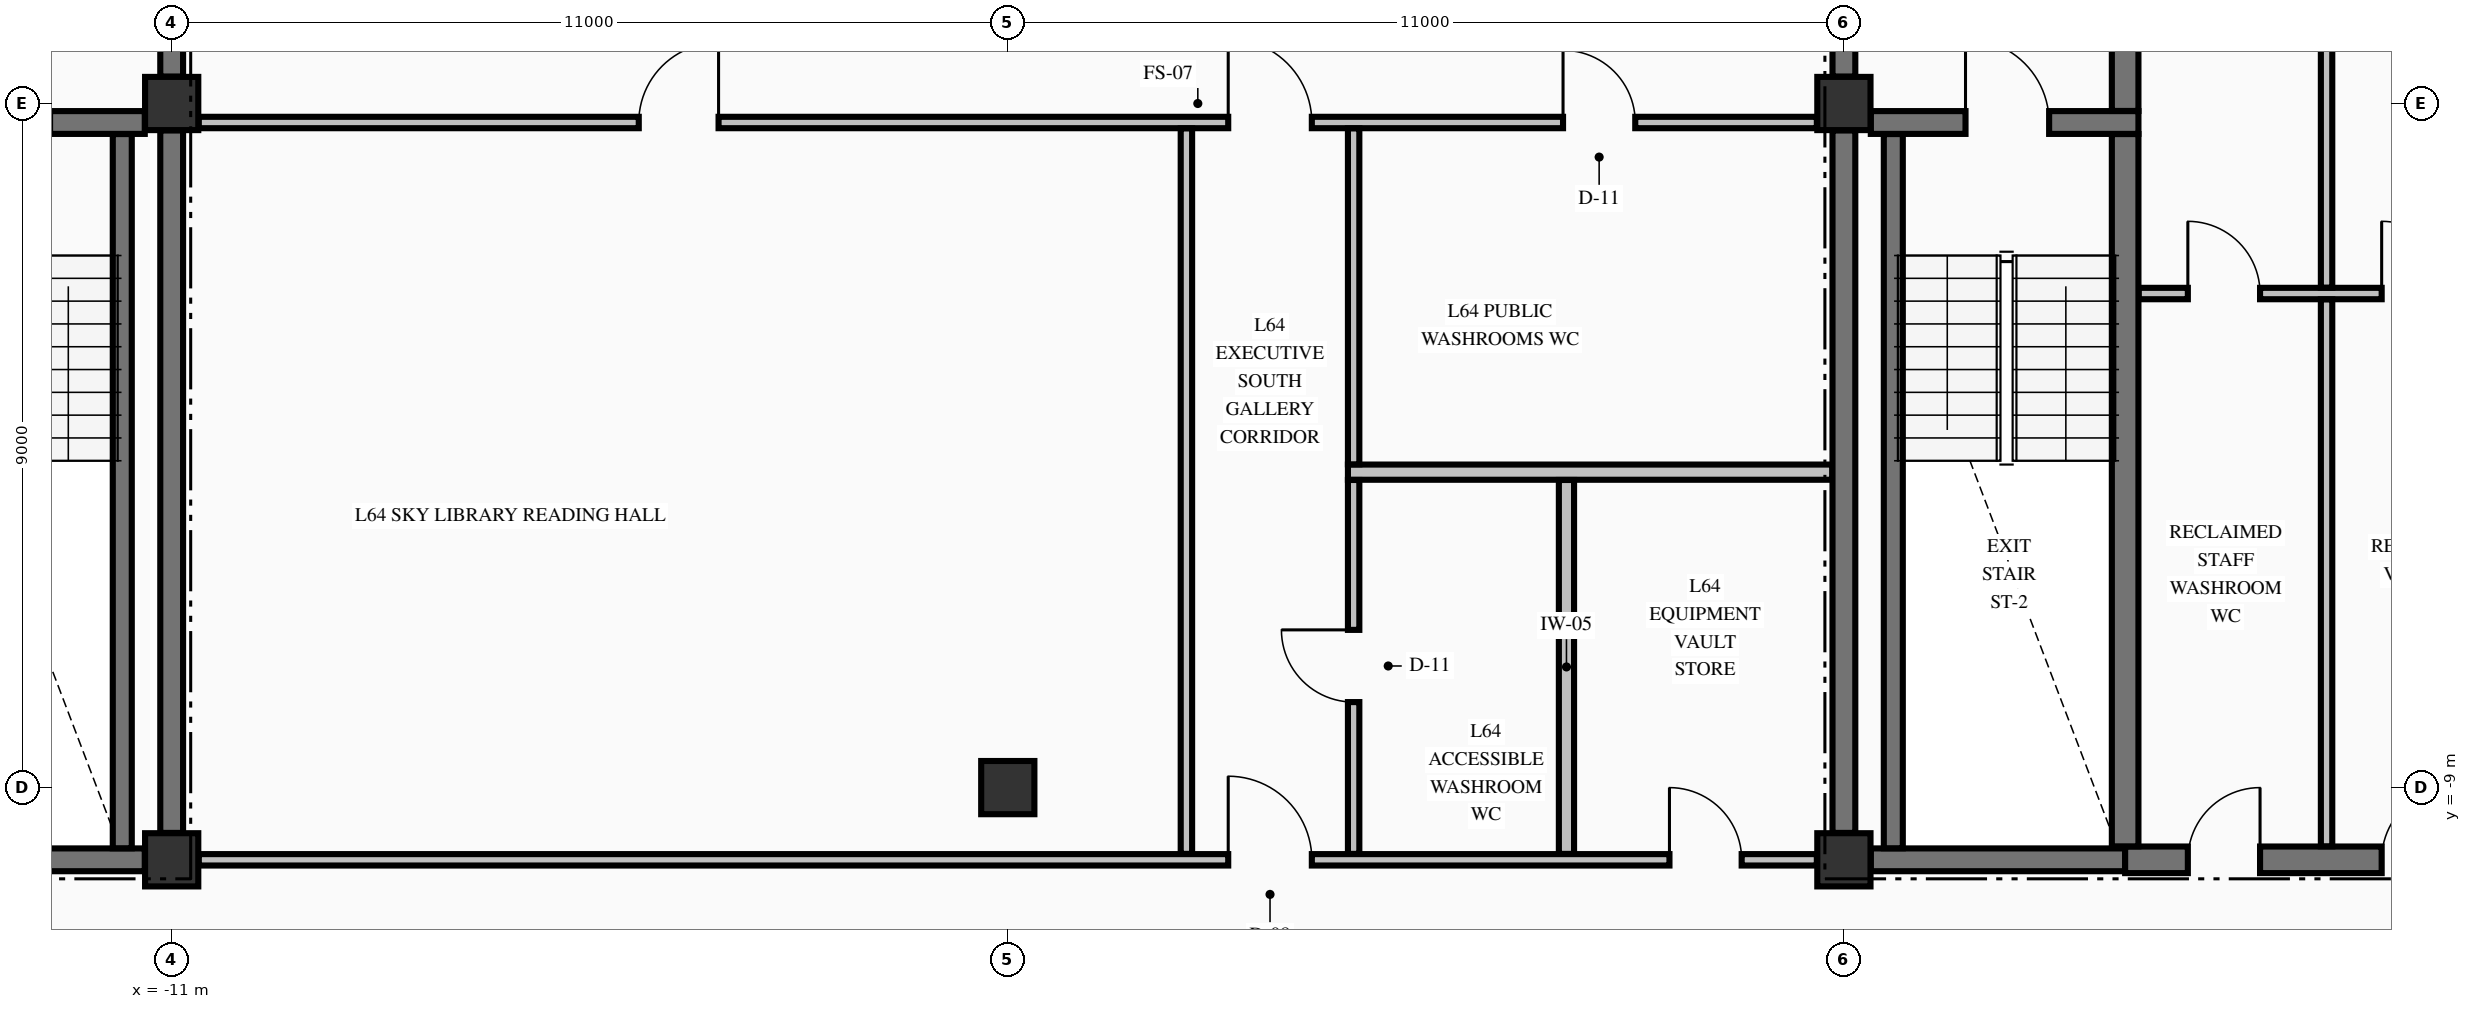
"""IFC4 building model, lengths in metres.
Left out: names, types, materials, properties, quantities, classifications, styles, units other than length and angle.
Written with IfcOpenShell. Run it as: python <this file> out.ifc"""

import sys

from ifc_helpers import new_model, si_unit, direction, frame, frame_2d, origin, origin_2d, place, context, subcontext, project, spatial, rectangle, extrude, element, fill, save


model = new_model("IFC4")
c1 = context("Model", 3, precision=1e-05, world=origin(), true_north=direction((0.0, 1.0)))
c2 = subcontext(c1, "Body", "Model", "MODEL_VIEW")
j1 = project(units=[si_unit("LENGTHUNIT", "METRE"), si_unit("PLANEANGLEUNIT", "RADIAN")], contexts=[c1])
p1 = place(None, origin())
s1 = spatial("IfcSite", under=j1, at=p1, CompositionType="ELEMENT")
p2 = place(p1, origin())
s2 = spatial("IfcBuilding", under=s1, at=p2, CompositionType="ELEMENT")
p3 = place(p2, frame((0.0, 0.0, 242.97)))
s3 = spatial("IfcBuildingStorey", under=s2, at=p3, CompositionType="ELEMENT", Elevation=242.97)
for number, where, z_axis, x_axis in (
    (1, (-11.0, -9.95, -0.25), (0.0, 0.0, 1.0), (1.0, 0.0, 0.0)),
    (2, (-11.0, 0.0, -0.25), (0.0, 0.0, 1.0), (1.0, 0.0, 0.0)),
    (3, (11.0, -9.95, -0.25), (0.0, 0.0, 1.0), (1.0, 0.0, 0.0)),
    (4, (11.0, 0.0, -0.25), (0.0, 0.0, 1.0), (1.0, 0.0, 0.0)),
    (5, (0.0, -9.0, -0.25), (0.0, 0.0, 1.0), (1.0, 0.0, 0.0)),
):
    element("IfcColumn", number, at=place(p3, frame(where, z_axis=z_axis, x_axis=x_axis)), inside=s3, PredefinedType="COLUMN", context=c2, shape_type="SweptSolid", body=[
        extrude(rectangle(XDim=0.7, YDim=0.7, at=origin_2d()), origin(), (0.0, 0.0, 1.0), 3.23),
    ])
for number, where, z_axis, x_axis in (
    (6, (-14.7, -9.95, 0.0), (0.0, 0.0, 1.0), (1.0, 0.0, 0.0)),
    (7, (11.354, -9.95, 0.0), (0.0, 0.0, 1.0), (1.0, 0.0, 0.0)),
):
    element("IfcWall", number, at=place(p3, frame(where, z_axis=z_axis, x_axis=x_axis)), inside=s3, PredefinedType="SHEAR", context=c2, shape_type="SweptSolid", body=[
        extrude(rectangle(XDim=3.346, YDim=0.3, at=frame_2d((1.673, 0.0))), origin(), (0.0, 0.0, 1.0), 2.98),
    ])
p4 = place(p3, frame((14.7, -9.95, 0.0), z_axis=(0.0, 0.0, 1.0), x_axis=(1.0, 0.0, 0.0)))
e8 = element("IfcWall", 8, at=p4, inside=s3, PredefinedType="SHEAR", context=c2, shape_type="SweptSolid", body=[
    extrude(rectangle(XDim=4.946, YDim=0.35, at=frame_2d((2.473, 0.0))), origin(), (0.0, 0.0, 1.0), 2.98),
])
p5 = place(p4, frame((0.825, 0.0, 0.0)))
e9 = element("IfcOpeningElement", 9, at=p5, cuts=e8, PredefinedType="OPENING", context=c2, shape_type="SweptSolid", body=[
    extrude(rectangle(XDim=0.95, YDim=2.15, at=frame_2d((0.475, 1.075))), frame((0.0, 0.185, 0.0), z_axis=(0.0, -1.0, 0.0), x_axis=(1.0, 0.0, 0.0)), (0.0, 0.0, 1.0), 0.37),
])
p6 = place(p4, frame((3.375, 0.0, 0.0)))
e10 = element("IfcOpeningElement", 10, at=p6, cuts=e8, PredefinedType="OPENING", context=c2, shape_type="SweptSolid", body=[
    extrude(rectangle(XDim=0.95, YDim=2.15, at=frame_2d((0.475, 1.075))), frame((0.0, 0.185, 0.0), z_axis=(0.0, -1.0, 0.0), x_axis=(1.0, 0.0, 0.0)), (0.0, 0.0, 1.0), 0.37),
])
p7 = place(p3, frame((-20.571, -0.25, 0.0), z_axis=(0.0, 0.0, 1.0), x_axis=(1.0, 0.0, 0.0)))
e11 = element("IfcWall", 11, at=p7, inside=s3, PredefinedType="SHEAR", context=c2, shape_type="SweptSolid", body=[
    extrude(rectangle(XDim=9.217, YDim=0.3, at=frame_2d((4.608, 0.0))), origin(), (0.0, 0.0, 1.0), 2.98),
])
p8 = place(p7, frame((6.871, 0.0, 0.0)))
e12 = element("IfcOpeningElement", 12, at=p8, cuts=e11, PredefinedType="OPENING", context=c2, shape_type="SweptSolid", body=[
    extrude(rectangle(XDim=1.1, YDim=2.15, at=frame_2d((0.55, 1.075))), frame((0.0, 0.16, 0.0), z_axis=(0.0, -1.0, 0.0), x_axis=(1.0, 0.0, 0.0)), (0.0, 0.0, 1.0), 0.32),
])
p9 = place(p3, frame((11.354, -0.25, 0.0), z_axis=(0.0, 0.0, 1.0), x_axis=(1.0, 0.0, 0.0)))
e13 = element("IfcWall", 13, at=p9, inside=s3, PredefinedType="SHEAR", context=c2, shape_type="SweptSolid", body=[
    extrude(rectangle(XDim=3.521, YDim=0.3, at=frame_2d((1.76, 0.0))), origin(), (0.0, 0.0, 1.0), 2.98),
])
p10 = place(p9, frame((1.246, 0.0, 0.0)))
e14 = element("IfcOpeningElement", 14, at=p10, cuts=e13, PredefinedType="OPENING", context=c2, shape_type="SweptSolid", body=[
    extrude(rectangle(XDim=1.1, YDim=2.15, at=frame_2d((0.55, 1.075))), frame((0.0, 0.16, 0.0), z_axis=(0.0, -1.0, 0.0), x_axis=(1.0, 0.0, 0.0)), (0.0, 0.0, 1.0), 0.32),
])
p11 = place(p3, frame((-10.644, -9.95, 0.0), z_axis=(0.0, 0.0, 1.0), x_axis=(1.0, 0.0, 0.0)))
e15 = element("IfcWall", 15, at=p11, inside=s3, PredefinedType="PARTITIONING", context=c2, shape_type="SweptSolid", body=[
    extrude(rectangle(XDim=21.288, YDim=0.15, at=frame_2d((10.644, 0.0))), origin(), (0.0, 0.0, 1.0), 2.98),
])
p12 = place(p11, frame((13.544, 0.0, 0.0)))
e16 = element("IfcOpeningElement", 16, at=p12, cuts=e15, PredefinedType="OPENING", context=c2, shape_type="SweptSolid", body=[
    extrude(rectangle(XDim=1.1, YDim=2.15, at=frame_2d((0.55, 1.075))), frame((0.0, 0.085, 0.0), z_axis=(0.0, -1.0, 0.0), x_axis=(1.0, 0.0, 0.0)), (0.0, 0.0, 1.0), 0.17),
])
p13 = place(p11, frame((19.349, 0.0, 0.0)))
e17 = element("IfcOpeningElement", 17, at=p13, cuts=e15, PredefinedType="OPENING", context=c2, shape_type="SweptSolid", body=[
    extrude(rectangle(XDim=0.95, YDim=2.15, at=frame_2d((0.475, 1.075))), frame((0.0, 0.085, 0.0), z_axis=(0.0, -1.0, 0.0), x_axis=(1.0, 0.0, 0.0)), (0.0, 0.0, 1.0), 0.17),
])
p14 = place(p3, frame((4.475, -4.85, 0.0), z_axis=(0.0, 0.0, 1.0), x_axis=(1.0, 0.0, 0.0)))
e18 = element("IfcWall", 18, at=p14, inside=s3, PredefinedType="PARTITIONING", context=c2, shape_type="SweptSolid", body=[
    extrude(rectangle(XDim=6.372, YDim=0.2, at=frame_2d((3.186, 0.0))), origin(), (0.0, 0.0, 1.0), 2.98),
])
p15 = place(p3, frame((14.878, -2.5, 0.0), z_axis=(0.0, 0.0, 1.0), x_axis=(1.0, 0.0, 0.0)))
e19 = element("IfcWall", 19, at=p15, inside=s3, PredefinedType="PARTITIONING", context=c2, shape_type="SweptSolid", body=[
    extrude(rectangle(XDim=4.944, YDim=0.15, at=frame_2d((2.472, 0.0))), origin(), (0.0, 0.0, 1.0), 2.98),
])
p16 = place(p15, frame((0.647, 0.0, 0.0)))
e20 = element("IfcOpeningElement", 20, at=p16, cuts=e19, PredefinedType="OPENING", context=c2, shape_type="SweptSolid", body=[
    extrude(rectangle(XDim=0.95, YDim=2.15, at=frame_2d((0.475, 1.075))), frame((0.0, 0.085, 0.0), z_axis=(0.0, -1.0, 0.0), x_axis=(1.0, 0.0, 0.0)), (0.0, 0.0, 1.0), 0.17),
])
p17 = place(p15, frame((3.197, 0.0, 0.0)))
e21 = element("IfcOpeningElement", 21, at=p17, cuts=e19, PredefinedType="OPENING", context=c2, shape_type="SweptSolid", body=[
    extrude(rectangle(XDim=0.95, YDim=2.15, at=frame_2d((0.475, 1.075))), frame((0.0, 0.085, 0.0), z_axis=(0.0, -1.0, 0.0), x_axis=(1.0, 0.0, 0.0)), (0.0, 0.0, 1.0), 0.17),
])
p18 = place(p3, frame((-10.644, -0.25, 0.0), z_axis=(0.0, 0.0, 1.0), x_axis=(1.0, 0.0, 0.0)))
e22 = element("IfcWall", 22, at=p18, inside=s3, PredefinedType="PARTITIONING", context=c2, shape_type="SweptSolid", body=[
    extrude(rectangle(XDim=21.288, YDim=0.15, at=frame_2d((10.644, 0.0))), origin(), (0.0, 0.0, 1.0), 2.98),
])
p19 = place(p18, frame((13.544, 0.0, 0.0)))
e23 = element("IfcOpeningElement", 23, at=p19, cuts=e22, PredefinedType="OPENING", context=c2, shape_type="SweptSolid", body=[
    extrude(rectangle(XDim=1.1, YDim=2.15, at=frame_2d((0.55, 1.075))), frame((0.0, 0.085, 0.0), z_axis=(0.0, -1.0, 0.0), x_axis=(1.0, 0.0, 0.0)), (0.0, 0.0, 1.0), 0.17),
])
p20 = place(p18, frame((5.789, 0.0, 0.0)))
e24 = element("IfcOpeningElement", 24, at=p20, cuts=e22, PredefinedType="OPENING", context=c2, shape_type="SweptSolid", body=[
    extrude(rectangle(XDim=1.05, YDim=2.15, at=frame_2d((0.525, 1.075))), frame((0.0, 0.085, 0.0), z_axis=(0.0, -1.0, 0.0), x_axis=(1.0, 0.0, 0.0)), (0.0, 0.0, 1.0), 0.17),
])
p21 = place(p18, frame((17.949, 0.0, 0.0)))
e25 = element("IfcOpeningElement", 25, at=p21, cuts=e22, PredefinedType="OPENING", context=c2, shape_type="SweptSolid", body=[
    extrude(rectangle(XDim=0.95, YDim=2.15, at=frame_2d((0.475, 1.075))), frame((0.0, 0.085, 0.0), z_axis=(0.0, -1.0, 0.0), x_axis=(1.0, 0.0, 0.0)), (0.0, 0.0, 1.0), 0.17),
])
p22 = place(p3, frame((-11.65, -9.798, 0.0), z_axis=(0.0, 0.0, 1.0), x_axis=(0.0, 1.0, 0.0)))
e26 = element("IfcWall", 26, at=p22, inside=s3, PredefinedType="SOLIDWALL", context=c2, shape_type="SweptSolid", body=[
    extrude(rectangle(XDim=9.396, YDim=0.25, at=frame_2d((4.698, 0.0))), origin(), (0.0, 0.0, 1.0), 2.98),
])
p23 = place(p3, frame((-11.0, -9.596, 0.0), z_axis=(0.0, 0.0, 1.0), x_axis=(0.0, 1.0, 0.0)))
e27 = element("IfcWall", 27, at=p23, inside=s3, PredefinedType="SHEAR", context=c2, shape_type="SweptSolid", body=[
    extrude(rectangle(XDim=9.242, YDim=0.3, at=frame_2d((4.621, 0.0))), origin(), (0.0, 0.0, 1.0), 2.98),
])
p24 = place(p3, frame((-11.0, 0.354, 0.0), z_axis=(0.0, 0.0, 1.0), x_axis=(0.0, 1.0, 0.0)))
e28 = element("IfcWall", 28, at=p24, inside=s3, PredefinedType="SHEAR", context=c2, shape_type="SweptSolid", body=[
    extrude(rectangle(XDim=2.394, YDim=0.3, at=frame_2d((1.197, 0.0))), origin(), (0.0, 0.0, 1.0), 2.98),
])
p25 = place(p24, frame((0.746, 0.0, 0.0)))
e29 = element("IfcOpeningElement", 29, at=p25, cuts=e28, PredefinedType="OPENING", context=c2, shape_type="SweptSolid", body=[
    extrude(rectangle(XDim=1.1, YDim=2.15, at=frame_2d((0.55, 1.075))), frame((0.0, 0.16, 0.0), z_axis=(0.0, -1.0, 0.0), x_axis=(1.0, 0.0, 0.0)), (0.0, 0.0, 1.0), 0.32),
])
p26 = place(p3, frame((11.0, -9.596, 0.0), z_axis=(0.0, 0.0, 1.0), x_axis=(0.0, 1.0, 0.0)))
e30 = element("IfcWall", 30, at=p26, inside=s3, PredefinedType="SHEAR", context=c2, shape_type="SweptSolid", body=[
    extrude(rectangle(XDim=9.242, YDim=0.3, at=frame_2d((4.621, 0.0))), origin(), (0.0, 0.0, 1.0), 2.98),
])
p27 = place(p3, frame((11.0, 0.354, 0.0), z_axis=(0.0, 0.0, 1.0), x_axis=(0.0, 1.0, 0.0)))
e31 = element("IfcWall", 31, at=p27, inside=s3, PredefinedType="SHEAR", context=c2, shape_type="SweptSolid", body=[
    extrude(rectangle(XDim=2.394, YDim=0.3, at=frame_2d((1.197, 0.0))), origin(), (0.0, 0.0, 1.0), 2.98),
])
p28 = place(p27, frame((0.746, 0.0, 0.0)))
e32 = element("IfcOpeningElement", 32, at=p28, cuts=e31, PredefinedType="OPENING", context=c2, shape_type="SweptSolid", body=[
    extrude(rectangle(XDim=1.1, YDim=2.15, at=frame_2d((0.55, 1.075))), frame((0.0, 0.16, 0.0), z_axis=(0.0, -1.0, 0.0), x_axis=(1.0, 0.0, 0.0)), (0.0, 0.0, 1.0), 0.32),
])
p29 = place(p3, frame((11.65, -9.798, 0.0), z_axis=(0.0, 0.0, 1.0), x_axis=(0.0, 1.0, 0.0)))
e33 = element("IfcWall", 33, at=p29, inside=s3, PredefinedType="SOLIDWALL", context=c2, shape_type="SweptSolid", body=[
    extrude(rectangle(XDim=9.396, YDim=0.25, at=frame_2d((4.698, 0.0))), origin(), (0.0, 0.0, 1.0), 2.98),
])
p30 = place(p3, frame((14.7, -9.773, 0.0), z_axis=(0.0, 0.0, 1.0), x_axis=(0.0, 1.0, 0.0)))
e34 = element("IfcWall", 34, at=p30, inside=s3, PredefinedType="SHEAR", context=c2, shape_type="SweptSolid", body=[
    extrude(rectangle(XDim=9.371, YDim=0.35, at=frame_2d((4.686, 0.0))), origin(), (0.0, 0.0, 1.0), 2.98),
])
p31 = place(p3, frame((14.7, -0.098, 0.0), z_axis=(0.0, 0.0, 1.0), x_axis=(0.0, 1.0, 0.0)))
e35 = element("IfcWall", 35, at=p31, inside=s3, PredefinedType="SHEAR", context=c2, shape_type="SweptSolid", body=[
    extrude(rectangle(XDim=2.846, YDim=0.35, at=frame_2d((1.423, 0.0))), origin(), (0.0, 0.0, 1.0), 2.98),
])
p32 = place(p3, frame((2.35, -9.872, 0.0), z_axis=(0.0, 0.0, 1.0), x_axis=(0.0, 1.0, 0.0)))
e36 = element("IfcWall", 36, at=p32, inside=s3, PredefinedType="PARTITIONING", context=c2, shape_type="SweptSolid", body=[
    extrude(rectangle(XDim=9.544, YDim=0.15, at=frame_2d((4.772, 0.0))), origin(), (0.0, 0.0, 1.0), 2.98),
])
p33 = place(p3, frame((4.55, -9.872, 0.0), z_axis=(0.0, 0.0, 1.0), x_axis=(0.0, 1.0, 0.0)))
e37 = element("IfcWall", 37, at=p33, inside=s3, PredefinedType="PARTITIONING", context=c2, shape_type="SweptSolid", body=[
    extrude(rectangle(XDim=4.919, YDim=0.15, at=frame_2d((2.459, 0.0))), origin(), (0.0, 0.0, 1.0), 2.98),
])
p34 = place(p33, frame((1.997, 0.0, 0.0)))
e38 = element("IfcOpeningElement", 38, at=p34, cuts=e37, PredefinedType="OPENING", context=c2, shape_type="SweptSolid", body=[
    extrude(rectangle(XDim=0.95, YDim=2.15, at=frame_2d((0.475, 1.075))), frame((0.0, 0.085, 0.0), z_axis=(0.0, -1.0, 0.0), x_axis=(1.0, 0.0, 0.0)), (0.0, 0.0, 1.0), 0.17),
])
p35 = place(p3, frame((4.55, -4.747, 0.0), z_axis=(0.0, 0.0, 1.0), x_axis=(0.0, 1.0, 0.0)))
e39 = element("IfcWall", 39, at=p35, inside=s3, PredefinedType="PARTITIONING", context=c2, shape_type="SweptSolid", body=[
    extrude(rectangle(XDim=4.419, YDim=0.15, at=frame_2d((2.209, 0.0))), origin(), (0.0, 0.0, 1.0), 2.98),
])
p36 = place(p3, frame((7.35, -9.872, 0.0), z_axis=(0.0, 0.0, 1.0), x_axis=(0.0, 1.0, 0.0)))
e40 = element("IfcWall", 40, at=p36, inside=s3, PredefinedType="PARTITIONING", context=c2, shape_type="SweptSolid", body=[
    extrude(rectangle(XDim=4.919, YDim=0.2, at=frame_2d((2.459, 0.0))), origin(), (0.0, 0.0, 1.0), 2.98),
])
p37 = place(p3, frame((17.35, -9.772, 0.0), z_axis=(0.0, 0.0, 1.0), x_axis=(0.0, 1.0, 0.0)))
e41 = element("IfcWall", 41, at=p37, inside=s3, PredefinedType="PARTITIONING", context=c2, shape_type="SweptSolid", body=[
    extrude(rectangle(XDim=7.194, YDim=0.15, at=frame_2d((3.597, 0.0))), origin(), (0.0, 0.0, 1.0), 2.98),
])
p38 = place(p3, frame((17.35, -2.422, 0.0), z_axis=(0.0, 0.0, 1.0), x_axis=(0.0, 1.0, 0.0)))
e42 = element("IfcWall", 42, at=p38, inside=s3, PredefinedType="PARTITIONING", context=c2, shape_type="SweptSolid", body=[
    extrude(rectangle(XDim=7.144, YDim=0.15, at=frame_2d((3.572, 0.0))), origin(), (0.0, 0.0, 1.0), 2.98),
])
p39 = place(p10, origin())
e43 = element("IfcDoor", 43, at=p39, inside=s3, OperationType="SINGLE_SWING_LEFT", PredefinedType="DOOR", context=c2, shape_type="SweptSolid", body=[
    extrude(rectangle(XDim=1.1, YDim=2.15, at=frame_2d((0.55, 1.075))), frame((0.0, 0.025, 0.0), z_axis=(0.0, -1.0, 0.0), x_axis=(1.0, 0.0, 0.0)), (0.0, 0.0, 1.0), 0.05),
])
fill(e14, e43)
p40 = place(p5, origin())
e44 = element("IfcDoor", 44, at=p40, inside=s3, OperationType="SINGLE_SWING_RIGHT", PredefinedType="DOOR", context=c2, shape_type="SweptSolid", body=[
    extrude(rectangle(XDim=0.95, YDim=2.15, at=frame_2d((0.475, 1.075))), frame((0.0, 0.025, 0.0), z_axis=(0.0, -1.0, 0.0), x_axis=(1.0, 0.0, 0.0)), (0.0, 0.0, 1.0), 0.05),
])
fill(e9, e44)
p41 = place(p16, origin())
e45 = element("IfcDoor", 45, at=p41, inside=s3, OperationType="SINGLE_SWING_LEFT", PredefinedType="DOOR", context=c2, shape_type="SweptSolid", body=[
    extrude(rectangle(XDim=0.95, YDim=2.15, at=frame_2d((0.475, 1.075))), frame((0.0, 0.025, 0.0), z_axis=(0.0, -1.0, 0.0), x_axis=(1.0, 0.0, 0.0)), (0.0, 0.0, 1.0), 0.05),
])
fill(e20, e45)
p42 = place(p6, origin())
e46 = element("IfcDoor", 46, at=p42, inside=s3, OperationType="SINGLE_SWING_RIGHT", PredefinedType="DOOR", context=c2, shape_type="SweptSolid", body=[
    extrude(rectangle(XDim=0.95, YDim=2.15, at=frame_2d((0.475, 1.075))), frame((0.0, 0.025, 0.0), z_axis=(0.0, -1.0, 0.0), x_axis=(1.0, 0.0, 0.0)), (0.0, 0.0, 1.0), 0.05),
])
fill(e10, e46)
p43 = place(p17, origin())
e47 = element("IfcDoor", 47, at=p43, inside=s3, OperationType="SINGLE_SWING_LEFT", PredefinedType="DOOR", context=c2, shape_type="SweptSolid", body=[
    extrude(rectangle(XDim=0.95, YDim=2.15, at=frame_2d((0.475, 1.075))), frame((0.0, 0.025, 0.0), z_axis=(0.0, -1.0, 0.0), x_axis=(1.0, 0.0, 0.0)), (0.0, 0.0, 1.0), 0.05),
])
fill(e21, e47)
p44 = place(p12, origin())
e48 = element("IfcDoor", 48, at=p44, inside=s3, OperationType="SINGLE_SWING_LEFT", PredefinedType="DOOR", context=c2, shape_type="SweptSolid", body=[
    extrude(rectangle(XDim=1.1, YDim=2.15, at=frame_2d((0.55, 1.075))), frame((0.0, 0.025, 0.0), z_axis=(0.0, -1.0, 0.0), x_axis=(1.0, 0.0, 0.0)), (0.0, 0.0, 1.0), 0.05),
])
fill(e16, e48)
p45 = place(p19, origin())
e49 = element("IfcDoor", 49, at=p45, inside=s3, OperationType="SINGLE_SWING_LEFT", PredefinedType="DOOR", context=c2, shape_type="SweptSolid", body=[
    extrude(rectangle(XDim=1.1, YDim=2.15, at=frame_2d((0.55, 1.075))), frame((0.0, 0.025, 0.0), z_axis=(0.0, -1.0, 0.0), x_axis=(1.0, 0.0, 0.0)), (0.0, 0.0, 1.0), 0.05),
])
fill(e23, e49)
p46 = place(p20, origin())
e50 = element("IfcDoor", 50, at=p46, inside=s3, OperationType="SINGLE_SWING_RIGHT", PredefinedType="DOOR", context=c2, shape_type="SweptSolid", body=[
    extrude(rectangle(XDim=1.05, YDim=2.15, at=frame_2d((0.525, 1.075))), frame((0.0, 0.025, 0.0), z_axis=(0.0, -1.0, 0.0), x_axis=(1.0, 0.0, 0.0)), (0.0, 0.0, 1.0), 0.05),
])
fill(e24, e50)
p47 = place(p21, origin())
e51 = element("IfcDoor", 51, at=p47, inside=s3, OperationType="SINGLE_SWING_LEFT", PredefinedType="DOOR", context=c2, shape_type="SweptSolid", body=[
    extrude(rectangle(XDim=0.95, YDim=2.15, at=frame_2d((0.475, 1.075))), frame((0.0, 0.025, 0.0), z_axis=(0.0, -1.0, 0.0), x_axis=(1.0, 0.0, 0.0)), (0.0, 0.0, 1.0), 0.05),
])
fill(e25, e51)
p48 = place(p34, origin())
e52 = element("IfcDoor", 52, at=p48, inside=s3, OperationType="SINGLE_SWING_RIGHT", PredefinedType="DOOR", context=c2, shape_type="SweptSolid", body=[
    extrude(rectangle(XDim=0.95, YDim=2.15, at=frame_2d((0.475, 1.075))), frame((0.0, 0.025, 0.0), z_axis=(0.0, -1.0, 0.0), x_axis=(1.0, 0.0, 0.0)), (0.0, 0.0, 1.0), 0.05),
])
fill(e38, e52)
p49 = place(p13, origin())
e53 = element("IfcDoor", 53, at=p49, inside=s3, OperationType="SINGLE_SWING_LEFT", PredefinedType="DOOR", context=c2, shape_type="SweptSolid", body=[
    extrude(rectangle(XDim=0.95, YDim=2.15, at=frame_2d((0.475, 1.075))), frame((0.0, 0.025, 0.0), z_axis=(0.0, -1.0, 0.0), x_axis=(1.0, 0.0, 0.0)), (0.0, 0.0, 1.0), 0.05),
])
fill(e17, e53)
save(model, sys.argv[1])
